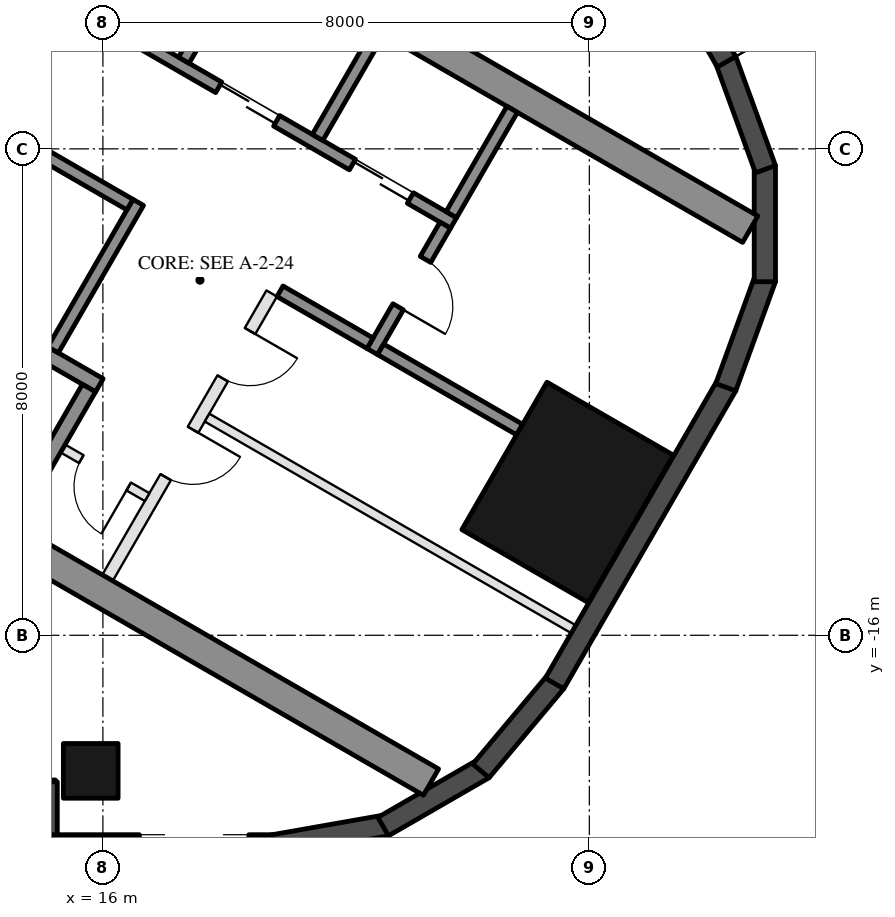
"""IFC4 building model, lengths in metres.
Left out: names, types, materials, properties, quantities, classifications, styles, units other than length and angle.
Written with IfcOpenShell. Run it as: python <this file> out.ifc"""

import sys

from ifc_helpers import new_model, si_unit, direction, frame, frame_2d, origin, origin_2d, place, context, subcontext, project, spatial, rectangle, hollow_rectangle, extrude, element, fill, save


model = new_model("IFC4")
c1 = context("Model", 3, precision=1e-05, world=origin(), true_north=direction((0.0, 1.0)))
c2 = subcontext(c1, "Body", "Model", "MODEL_VIEW")
j1 = project(units=[si_unit("LENGTHUNIT", "METRE"), si_unit("PLANEANGLEUNIT", "RADIAN")], contexts=[c1])
p1 = place(None, origin())
s1 = spatial("IfcSite", under=j1, at=p1, CompositionType="ELEMENT")
p2 = place(p1, origin())
s2 = spatial("IfcBuilding", under=s1, at=p2, CompositionType="ELEMENT")
p3 = place(p2, frame((0.0, 0.0, 109.4)))
s3 = spatial("IfcBuildingStorey", under=s2, at=p3, CompositionType="ELEMENT", Elevation=109.4)
p4 = place(p3, frame((15.8, -18.23, 0.0), z_axis=(0.0, 0.0, 1.0), x_axis=(-1.0, 0.0, 0.0)))
e1 = element("IfcColumn", 1, at=p4, inside=s3, PredefinedType="COLUMN", context=c2, shape_type="SweptSolid", body=[
    extrude(hollow_rectangle(XDim=0.9, YDim=0.9, WallThickness=0.04, at=origin_2d()), origin(), (0.0, 0.0, 1.0), 3.7),
])
p5 = place(p3, frame((23.643, -13.65, 0.0), z_axis=(0.0, 0.0, 1.0), x_axis=(0.5, 0.866025403784, 0.0)))
e2 = element("IfcColumn", 2, at=p5, inside=s3, PredefinedType="COLUMN", context=c2, shape_type="SweptSolid", body=[
    extrude(hollow_rectangle(XDim=2.8, YDim=2.4, WallThickness=0.07, at=origin_2d()), origin(), (0.0, 0.0, 1.0), 3.7),
])
p6 = place(p3, frame((8.48, -18.555, 0.0), z_axis=(0.0, 0.0, 1.0), x_axis=(1.0, 0.0, 0.0)))
e3 = element("IfcWall", 3, at=p6, inside=s3, PredefinedType="SOLIDWALL", context=c2, shape_type="SweptSolid", body=[
    extrude(rectangle(XDim=6.74, YDim=0.35, at=frame_2d((3.37, 0.0))), origin(), (0.0, 0.0, 1.0), 3.55),
])
p7 = place(p6, frame((0.32, 0.0, 0.0)))
e4 = element("IfcOpeningElement", 4, at=p7, cuts=e3, PredefinedType="OPENING", context=c2, shape_type="SweptSolid", body=[
    extrude(rectangle(XDim=2.4, YDim=2.4, at=frame_2d((1.2, 1.2))), frame((0.0, 0.185, 0.0), z_axis=(0.0, -1.0, 0.0), x_axis=(1.0, 0.0, 0.0)), (0.0, 0.0, 1.0), 0.37),
])
p8 = place(p6, frame((3.02, 0.0, 0.3)))
e5 = element("IfcOpeningElement", 5, at=p8, cuts=e3, PredefinedType="OPENING", context=c2, shape_type="SweptSolid", body=[
    extrude(rectangle(XDim=2.9, YDim=2.65, at=frame_2d((1.45, 1.325))), frame((0.0, 0.185, 0.0), z_axis=(0.0, -1.0, 0.0), x_axis=(1.0, 0.0, 0.0)), (0.0, 0.0, 1.0), 0.37),
])
p9 = place(p3, frame((15.075, -18.41, 0.0), z_axis=(0.0, 0.0, 1.0), x_axis=(0.0, -1.0, 0.0)))
e6 = element("IfcWall", 6, at=p9, inside=s3, PredefinedType="SOLIDWALL", context=c2, shape_type="SweptSolid", body=[
    extrude(rectangle(XDim=1.22, YDim=0.35, at=frame_2d((0.61, 0.0))), origin(), (0.0, 0.0, 1.0), 3.55),
])
p10 = place(p3, frame((14.9, -19.455, 0.0), z_axis=(0.0, 0.0, 1.0), x_axis=(1.0, 0.0, 0.0)))
e7 = element("IfcWall", 7, at=p10, inside=s3, PredefinedType="SOLIDWALL", context=c2, shape_type="SweptSolid", body=[
    extrude(rectangle(XDim=3.916, YDim=0.35, at=frame_2d((1.958, 0.0))), origin(), (0.0, 0.0, 1.0), 3.55),
])
p11 = place(p10, frame((1.7, 0.0, 0.3)))
e8 = element("IfcOpeningElement", 8, at=p11, cuts=e7, PredefinedType="OPENING", context=c2, shape_type="SweptSolid", body=[
    extrude(rectangle(XDim=1.8, YDim=2.65, at=frame_2d((0.9, 1.325))), frame((0.0, 0.185, 0.0), z_axis=(0.0, -1.0, 0.0), x_axis=(1.0, 0.0, 0.0)), (0.0, 0.0, 1.0), 0.37),
])
p12 = place(p3, frame((18.785, -19.458, 0.0), z_axis=(0.0, 0.0, 1.0), x_axis=(0.984798995425, 0.173697837091, 0.0)))
e9 = element("IfcWall", 9, at=p12, inside=s3, PredefinedType="SOLIDWALL", context=c2, shape_type="SweptSolid", body=[
    extrude(rectangle(XDim=1.91, YDim=0.35, at=frame_2d((0.955, 0.0))), origin(), (0.0, 0.0, 1.0), 3.55),
])
for number, where, z_axis, x_axis in (
    (10, (20.61, -19.147, 0.0), (0.0, 0.0, 1.0), (0.866, 0.5, 0.0)),
    (11, (22.217, -18.231, 0.0), (0.0, 0.0, 1.0), (0.643, 0.766, 0.0)),
):
    element("IfcWall", number, at=place(p3, frame(where, z_axis=z_axis, x_axis=x_axis)), inside=s3, PredefinedType="SOLIDWALL", context=c2, shape_type="SweptSolid", body=[
        extrude(rectangle(XDim=1.91, YDim=0.35, at=frame_2d((0.955, 0.0))), origin(), (0.0, 0.0, 1.0), 3.55),
    ])
p13 = place(p3, frame((23.427, -16.792, 0.0), z_axis=(0.0, 0.0, 1.0), x_axis=(0.500018773155, 0.866014564827, 0.0)))
e12 = element("IfcWall", 12, at=p13, inside=s3, PredefinedType="SOLIDWALL", context=c2, shape_type="SweptSolid", body=[
    extrude(rectangle(XDim=5.658, YDim=0.35, at=frame_2d((2.829, 0.0))), origin(), (0.0, 0.0, 1.0), 3.55),
])
for number, where, z_axis, x_axis in (
    (13, (26.244, -11.92, 0.0), (0.0, 0.0, 1.0), (0.342, 0.94, 0.0)),
    (14, (26.886, -10.185, 0.0), (0.0, 0.0, 1.0), (0.0, 1.0, 0.0)),
    (15, (26.897, -8.335, 0.0), (0.0, 0.0, 1.0), (-0.342, 0.94, 0.0)),
):
    element("IfcWall", number, at=place(p3, frame(where, z_axis=z_axis, x_axis=x_axis)), inside=s3, PredefinedType="SOLIDWALL", context=c2, shape_type="SweptSolid", body=[
        extrude(rectangle(XDim=1.91, YDim=0.35, at=frame_2d((0.955, 0.0))), origin(), (0.0, 0.0, 1.0), 3.55),
    ])
p14 = place(p3, frame((26.257, -6.567, 0.0), z_axis=(0.0, 0.0, 1.0), x_axis=(-0.500023526245, 0.866011820475, 0.0)))
e16 = element("IfcWall", 16, at=p14, inside=s3, PredefinedType="SOLIDWALL", context=c2, shape_type="SweptSolid", body=[
    extrude(rectangle(XDim=11.816, YDim=0.35, at=frame_2d((5.908, 0.0))), origin(), (0.0, 0.0, 1.0), 3.55),
])
p15 = place(p14, frame((0.38, 0.0, 0.3)))
e17 = element("IfcOpeningElement", 17, at=p15, cuts=e16, PredefinedType="OPENING", context=c2, shape_type="SweptSolid", body=[
    extrude(rectangle(XDim=1.8, YDim=2.65, at=frame_2d((0.9, 1.325))), frame((0.0, 0.185, 0.0), z_axis=(0.0, -1.0, 0.0), x_axis=(1.0, 0.0, 0.0)), (0.0, 0.0, 1.0), 0.37),
])
p16 = place(p14, frame((7.716, 0.0, 0.0)))
e18 = element("IfcOpeningElement", 18, at=p16, cuts=e16, PredefinedType="OPENING", context=c2, shape_type="SweptSolid", body=[
    extrude(rectangle(XDim=2.4, YDim=2.4, at=frame_2d((1.2, 1.2))), frame((0.0, 0.185, 0.0), z_axis=(0.0, -1.0, 0.0), x_axis=(1.0, 0.0, 0.0)), (0.0, 0.0, 1.0), 0.37),
])
p17 = place(p14, frame((3.816, 0.0, 0.3)))
e19 = element("IfcOpeningElement", 19, at=p17, cuts=e16, PredefinedType="OPENING", context=c2, shape_type="SweptSolid", body=[
    extrude(rectangle(XDim=1.6, YDim=2.65, at=frame_2d((0.8, 1.325))), frame((0.0, 0.185, 0.0), z_axis=(0.0, -1.0, 0.0), x_axis=(1.0, 0.0, 0.0)), (0.0, 0.0, 1.0), 0.37),
])
p18 = place(p14, frame((5.716, 0.0, 0.3)))
e20 = element("IfcOpeningElement", 20, at=p18, cuts=e16, PredefinedType="OPENING", context=c2, shape_type="SweptSolid", body=[
    extrude(rectangle(XDim=1.6, YDim=2.65, at=frame_2d((0.8, 1.325))), frame((0.0, 0.185, 0.0), z_axis=(0.0, -1.0, 0.0), x_axis=(1.0, 0.0, 0.0)), (0.0, 0.0, 1.0), 0.37),
])
for number, where, z_axis, x_axis in (
    (21, (8.547, -10.997, 0.0), (0.0, 0.0, 1.0), (0.866, -0.5, 0.0)),
    (22, (13.797, -1.903, 0.0), (0.0, 0.0, 1.0), (0.866, -0.5, 0.0)),
):
    element("IfcWall", number, at=place(p3, frame(where, z_axis=z_axis, x_axis=x_axis)), inside=s3, PredefinedType="SHEAR", context=c2, shape_type="SweptSolid", body=[
        extrude(rectangle(XDim=14.837, YDim=0.5, at=frame_2d((7.418, 0.0))), origin(), (0.0, 0.0, 1.0), 3.5),
    ])
p19 = place(p3, frame((10.356, -8.664, 0.0), z_axis=(0.0, 0.0, 1.0), x_axis=(0.866028629588, -0.499994412703, 0.0)))
e23 = element("IfcWall", 23, at=p19, inside=s3, PredefinedType="SHEAR", context=c2, shape_type="SweptSolid", body=[
    extrude(rectangle(XDim=6.45, YDim=0.25, at=frame_2d((3.225, 0.0))), origin(), (0.0, 0.0, 1.0), 3.5),
])
p20 = place(p19, frame((0.3, 0.0, 0.0)))
e24 = element("IfcOpeningElement", 24, at=p20, cuts=e23, PredefinedType="OPENING", context=c2, shape_type="SweptSolid", body=[
    extrude(rectangle(XDim=1.0, YDim=2.1, at=frame_2d((0.5, 1.05))), frame((0.0, 0.135, 0.0), z_axis=(0.0, -1.0, 0.0), x_axis=(1.0, 0.0, 0.0)), (0.0, 0.0, 1.0), 0.27),
])
p21 = place(p3, frame((14.496, -14.143, 0.0), z_axis=(0.0, 0.0, 1.0), x_axis=(0.500062241894, 0.865989465428, 0.0)))
e25 = element("IfcWall", 25, at=p21, inside=s3, PredefinedType="SHEAR", context=c2, shape_type="SweptSolid", body=[
    extrude(rectangle(XDim=2.55, YDim=0.25, at=frame_2d((1.275, 0.0))), origin(), (0.0, 0.0, 1.0), 3.5),
])
p22 = place(p3, frame((15.181, -11.305, 0.0), z_axis=(0.0, 0.0, 1.0), x_axis=(0.49994636267, 0.866056369097, 0.0)))
e26 = element("IfcWall", 26, at=p22, inside=s3, PredefinedType="SHEAR", context=c2, shape_type="SweptSolid", body=[
    extrude(rectangle(XDim=2.8, YDim=0.2, at=frame_2d((1.4, 0.0))), origin(), (0.0, 0.0, 1.0), 3.5),
])
p23 = place(p3, frame((14.02, -7.517, 0.0), z_axis=(0.0, 0.0, 1.0), x_axis=(0.866034573852, -0.49998411664, 0.0)))
e27 = element("IfcWall", 27, at=p23, inside=s3, PredefinedType="SHEAR", context=c2, shape_type="SweptSolid", body=[
    extrude(rectangle(XDim=2.8, YDim=0.2, at=frame_2d((1.4, 0.0))), origin(), (0.0, 0.0, 1.0), 3.5),
])
p24 = place(p3, frame((12.968, -4.138, 0.0), z_axis=(0.0, 0.0, 1.0), x_axis=(0.866028328073, -0.49999493495, 0.0)))
e28 = element("IfcWall", 28, at=p24, inside=s3, PredefinedType="SHEAR", context=c2, shape_type="SweptSolid", body=[
    extrude(rectangle(XDim=10.16, YDim=0.2, at=frame_2d((5.08, 0.0))), origin(), (0.0, 0.0, 1.0), 3.5),
])
p25 = place(p24, frame((0.62, 0.0, 0.0)))
e29 = element("IfcOpeningElement", 29, at=p25, cuts=e28, PredefinedType="OPENING", context=c2, shape_type="SweptSolid", body=[
    extrude(rectangle(XDim=1.1, YDim=2.1, at=frame_2d((0.55, 1.05))), frame((0.0, 0.11, 0.0), z_axis=(0.0, -1.0, 0.0), x_axis=(1.0, 0.0, 0.0)), (0.0, 0.0, 1.0), 0.22),
])
p26 = place(p24, frame((3.16, 0.0, 0.0)))
e30 = element("IfcOpeningElement", 30, at=p26, cuts=e28, PredefinedType="OPENING", context=c2, shape_type="SweptSolid", body=[
    extrude(rectangle(XDim=1.1, YDim=2.1, at=frame_2d((0.55, 1.05))), frame((0.0, 0.11, 0.0), z_axis=(0.0, -1.0, 0.0), x_axis=(1.0, 0.0, 0.0)), (0.0, 0.0, 1.0), 0.22),
])
p27 = place(p24, frame((5.7, 0.0, 0.0)))
e31 = element("IfcOpeningElement", 31, at=p27, cuts=e28, PredefinedType="OPENING", context=c2, shape_type="SweptSolid", body=[
    extrude(rectangle(XDim=1.1, YDim=2.1, at=frame_2d((0.55, 1.05))), frame((0.0, 0.11, 0.0), z_axis=(0.0, -1.0, 0.0), x_axis=(1.0, 0.0, 0.0)), (0.0, 0.0, 1.0), 0.22),
])
p28 = place(p24, frame((8.24, 0.0, 0.0)))
e32 = element("IfcOpeningElement", 32, at=p28, cuts=e28, PredefinedType="OPENING", context=c2, shape_type="SweptSolid", body=[
    extrude(rectangle(XDim=1.1, YDim=2.1, at=frame_2d((0.55, 1.05))), frame((0.0, 0.11, 0.0), z_axis=(0.0, -1.0, 0.0), x_axis=(1.0, 0.0, 0.0)), (0.0, 0.0, 1.0), 0.22),
])
p29 = place(p3, frame((20.43, -11.333, 0.0), z_axis=(0.0, 0.0, 1.0), x_axis=(0.500001309137, 0.866024647952, 0.0)))
e33 = element("IfcWall", 33, at=p29, inside=s3, PredefinedType="SHEAR", context=c2, shape_type="SweptSolid", body=[
    extrude(rectangle(XDim=2.4, YDim=0.2, at=frame_2d((1.2, 0.0))), origin(), (0.0, 0.0, 1.0), 3.5),
])
p30 = place(p29, frame((0.85, 0.0, 0.0)))
e34 = element("IfcOpeningElement", 34, at=p30, cuts=e33, PredefinedType="OPENING", context=c2, shape_type="SweptSolid", body=[
    extrude(rectangle(XDim=0.9, YDim=2.1, at=frame_2d((0.45, 1.05))), frame((0.0, 0.11, 0.0), z_axis=(0.0, -1.0, 0.0), x_axis=(1.0, 0.0, 0.0)), (0.0, 0.0, 1.0), 0.22),
])
p31 = place(p3, frame((18.913, -10.342, 0.0), z_axis=(0.0, 0.0, 1.0), x_axis=(0.866038183914, -0.499977863513, 0.0)))
e35 = element("IfcWall", 35, at=p31, inside=s3, PredefinedType="SHEAR", context=c2, shape_type="SweptSolid", body=[
    extrude(rectangle(XDim=1.71, YDim=0.2, at=frame_2d((0.855, 0.0))), origin(), (0.0, 0.0, 1.0), 3.5),
])
for number, where, z_axis, x_axis in (
    (36, (17.331, -6.542, 0.0), (0.0, 0.0, 1.0), (0.5, 0.866, 0.0)),
    (37, (19.531, -7.812, 0.0), (0.0, 0.0, 1.0), (0.5, 0.866, 0.0)),
    (38, (21.73, -9.082, 0.0), (0.0, 0.0, 1.0), (0.5, 0.866, 0.0)),
):
    element("IfcWall", number, at=place(p3, frame(where, z_axis=z_axis, x_axis=x_axis)), inside=s3, PredefinedType="SHEAR", context=c2, shape_type="SweptSolid", body=[
        extrude(rectangle(XDim=2.0, YDim=0.2, at=frame_2d((1.0, 0.0))), origin(), (0.0, 0.0, 1.0), 3.5),
    ])
p32 = place(p3, frame((20.567, -11.297, 0.0), z_axis=(0.0, 0.0, 1.0), x_axis=(0.866060851709, -0.499938597367, 0.0)))
e39 = element("IfcWall", 39, at=p32, inside=s3, PredefinedType="SHEAR", context=c2, shape_type="SweptSolid", body=[
    extrude(rectangle(XDim=2.64, YDim=0.2, at=frame_2d((1.32, 0.0))), origin(), (0.0, 0.0, 1.0), 3.5),
])
p33 = place(p3, frame((16.076, -15.055, 0.0), z_axis=(0.0, 0.0, 1.0), x_axis=(0.499995103361, 0.866028230842, 0.0)))
e40 = element("IfcWall", 40, at=p33, inside=s3, PredefinedType="PARTITIONING", context=c2, shape_type="SweptSolid", body=[
    extrude(rectangle(XDim=5.4, YDim=0.2, at=frame_2d((2.7, 0.0))), origin(), (0.0, 0.0, 1.0), 3.5),
])
p34 = place(p33, frame((1.913, 0.0, 0.0)))
e41 = element("IfcOpeningElement", 41, at=p34, cuts=e40, PredefinedType="OPENING", context=c2, shape_type="SweptSolid", body=[
    extrude(rectangle(XDim=0.9, YDim=2.1, at=frame_2d((0.45, 1.05))), frame((0.0, 0.11, 0.0), z_axis=(0.0, -1.0, 0.0), x_axis=(1.0, 0.0, 0.0)), (0.0, 0.0, 1.0), 0.22),
])
p35 = place(p33, frame((3.788, 0.0, 0.0)))
e42 = element("IfcOpeningElement", 42, at=p35, cuts=e40, PredefinedType="OPENING", context=c2, shape_type="SweptSolid", body=[
    extrude(rectangle(XDim=0.9, YDim=2.1, at=frame_2d((0.45, 1.05))), frame((0.0, 0.11, 0.0), z_axis=(0.0, -1.0, 0.0), x_axis=(1.0, 0.0, 0.0)), (0.0, 0.0, 1.0), 0.22),
])
p36 = place(p3, frame((15.342, -12.928, 0.0), z_axis=(0.0, 0.0, 1.0), x_axis=(0.865989903783, -0.500061482766, 0.0)))
e43 = element("IfcWall", 43, at=p36, inside=s3, PredefinedType="PARTITIONING", context=c2, shape_type="SweptSolid", body=[
    extrude(rectangle(XDim=1.6, YDim=0.15, at=frame_2d((0.8, 0.0))), origin(), (0.0, 0.0, 1.0), 3.5),
])
p37 = place(p36, frame((0.35, 0.0, 0.0)))
e44 = element("IfcOpeningElement", 44, at=p37, cuts=e43, PredefinedType="OPENING", context=c2, shape_type="SweptSolid", body=[
    extrude(rectangle(XDim=0.9, YDim=2.1, at=frame_2d((0.45, 1.05))), frame((0.0, 0.085, 0.0), z_axis=(0.0, -1.0, 0.0), x_axis=(1.0, 0.0, 0.0)), (0.0, 0.0, 1.0), 0.17),
])
p38 = place(p3, frame((17.713, -12.42, 0.0), z_axis=(0.0, 0.0, 1.0), x_axis=(0.866016523273, -0.500015381182, 0.0)))
e45 = element("IfcWall", 45, at=p38, inside=s3, PredefinedType="PARTITIONING", context=c2, shape_type="SweptSolid", body=[
    extrude(rectangle(XDim=6.95, YDim=0.15, at=frame_2d((3.475, 0.0))), origin(), (0.0, 0.0, 1.0), 3.5),
])
p39 = place(p37, frame((0.9, 0.0, 0.0), z_axis=(0.0, 0.0, 1.0), x_axis=(-1.0, 0.0, 0.0)))
e46 = element("IfcDoor", 46, at=p39, inside=s3, OperationType="SINGLE_SWING_LEFT", PredefinedType="DOOR", context=c2, shape_type="SweptSolid", body=[
    extrude(rectangle(XDim=0.9, YDim=2.1, at=frame_2d((0.45, 1.05))), frame((0.0, 0.025, 0.0), z_axis=(0.0, -1.0, 0.0), x_axis=(1.0, 0.0, 0.0)), (0.0, 0.0, 1.0), 0.05),
])
fill(e44, e46)
p40 = place(p27, origin())
e47 = element("IfcDoor", 47, at=p40, inside=s3, OperationType="DOUBLE_DOOR_SLIDING", PredefinedType="DOOR", context=c2, shape_type="SweptSolid", body=[
    extrude(rectangle(XDim=1.1, YDim=2.1, at=frame_2d((0.55, 1.05))), frame((0.0, 0.025, 0.0), z_axis=(0.0, -1.0, 0.0), x_axis=(1.0, 0.0, 0.0)), (0.0, 0.0, 1.0), 0.05),
])
fill(e31, e47)
p41 = place(p28, origin())
e48 = element("IfcDoor", 48, at=p41, inside=s3, OperationType="DOUBLE_DOOR_SLIDING", PredefinedType="DOOR", context=c2, shape_type="SweptSolid", body=[
    extrude(rectangle(XDim=1.1, YDim=2.1, at=frame_2d((0.55, 1.05))), frame((0.0, 0.025, 0.0), z_axis=(0.0, -1.0, 0.0), x_axis=(1.0, 0.0, 0.0)), (0.0, 0.0, 1.0), 0.05),
])
fill(e32, e48)
p42 = place(p30, frame((0.9, 0.0, 0.0), z_axis=(0.0, 0.0, 1.0), x_axis=(-1.0, 0.0, 0.0)))
e49 = element("IfcDoor", 49, at=p42, inside=s3, OperationType="SINGLE_SWING_RIGHT", PredefinedType="DOOR", context=c2, shape_type="SweptSolid", body=[
    extrude(rectangle(XDim=0.9, YDim=2.1, at=frame_2d((0.45, 1.05))), frame((0.0, 0.025, 0.0), z_axis=(0.0, -1.0, 0.0), x_axis=(1.0, 0.0, 0.0)), (0.0, 0.0, 1.0), 0.05),
])
fill(e34, e49)
p43 = place(p34, frame((0.9, 0.0, 0.0), z_axis=(0.0, 0.0, 1.0), x_axis=(-1.0, 0.0, 0.0)))
e50 = element("IfcDoor", 50, at=p43, inside=s3, OperationType="SINGLE_SWING_LEFT", PredefinedType="DOOR", context=c2, shape_type="SweptSolid", body=[
    extrude(rectangle(XDim=0.9, YDim=2.1, at=frame_2d((0.45, 1.05))), frame((0.0, 0.025, 0.0), z_axis=(0.0, -1.0, 0.0), x_axis=(1.0, 0.0, 0.0)), (0.0, 0.0, 1.0), 0.05),
])
fill(e41, e50)
p44 = place(p35, frame((0.9, 0.0, 0.0), z_axis=(0.0, 0.0, 1.0), x_axis=(-1.0, 0.0, 0.0)))
e51 = element("IfcDoor", 51, at=p44, inside=s3, OperationType="SINGLE_SWING_LEFT", PredefinedType="DOOR", context=c2, shape_type="SweptSolid", body=[
    extrude(rectangle(XDim=0.9, YDim=2.1, at=frame_2d((0.45, 1.05))), frame((0.0, 0.025, 0.0), z_axis=(0.0, -1.0, 0.0), x_axis=(1.0, 0.0, 0.0)), (0.0, 0.0, 1.0), 0.05),
])
fill(e42, e51)
save(model, sys.argv[1])
